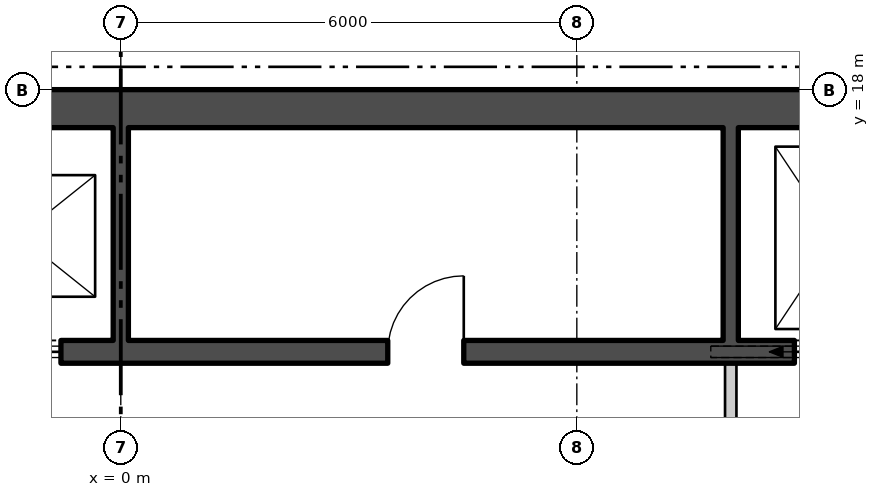
"""IFC4 building model, lengths in metres.
Left out: names, types, materials, properties, quantities, classifications, styles, units other than length and angle.
Written with IfcOpenShell. Run it as: python <this file> out.ifc"""

import sys

from ifc_helpers import new_model, si_unit, direction, frame, frame_2d, origin, place, context, subcontext, project, spatial, rectangle, extrude, element, fill, save


model = new_model("IFC4")
c1 = context("Model", 3, precision=1e-05, world=origin(), true_north=direction((0.0, 1.0)))
c2 = subcontext(c1, "Body", "Model", "MODEL_VIEW")
j1 = project(units=[si_unit("LENGTHUNIT", "METRE"), si_unit("PLANEANGLEUNIT", "RADIAN")], contexts=[c1])
p1 = place(None, origin())
s1 = spatial("IfcSite", under=j1, at=p1, CompositionType="ELEMENT")
p2 = place(p1, origin())
s2 = spatial("IfcBuilding", under=s1, at=p2, CompositionType="ELEMENT")
p3 = place(p2, frame((0.0, 0.0, 151.5)))
s3 = spatial("IfcBuildingStorey", under=s2, at=p3, CompositionType="ELEMENT", Elevation=151.5)
p4 = place(p3, frame((-16.2, 17.75, 0.0), z_axis=(0.0, 0.0, 1.0), x_axis=(1.0, 0.0, 0.0)))
e1 = element("IfcWall", 1, at=p4, inside=s3, PredefinedType="SHEAR", context=c2, shape_type="SweptSolid", body=[
    extrude(rectangle(XDim=32.4, YDim=0.5, at=frame_2d((16.2, 0.0))), origin(), (0.0, 0.0, 1.0), 3.7),
])
p5 = place(p3, frame((-10.7, 14.55, 0.0), z_axis=(0.0, 0.0, 1.0), x_axis=(1.0, 0.0, 0.0)))
e2 = element("IfcWall", 2, at=p5, inside=s3, PredefinedType="SHEAR", context=c2, shape_type="SweptSolid", body=[
    extrude(rectangle(XDim=21.4, YDim=0.3, at=frame_2d((10.7, 0.0))), origin(), (0.0, 0.0, 1.0), 3.7),
])
p6 = place(p5, frame((0.738, 0.0, 0.0)))
e3 = element("IfcOpeningElement", 3, at=p6, cuts=e2, PredefinedType="OPENING", context=c2, shape_type="SweptSolid", body=[
    extrude(rectangle(XDim=1.1, YDim=2.1, at=frame_2d((0.55, 1.05))), frame((0.0, 0.16, 0.0), z_axis=(0.0, -1.0, 0.0), x_axis=(1.0, 0.0, 0.0)), (0.0, 0.0, 1.0), 0.32),
])
p7 = place(p5, frame((3.462, 0.0, 0.0)))
e4 = element("IfcOpeningElement", 4, at=p7, cuts=e2, PredefinedType="OPENING", context=c2, shape_type="SweptSolid", body=[
    extrude(rectangle(XDim=1.1, YDim=2.1, at=frame_2d((0.55, 1.05))), frame((0.0, 0.16, 0.0), z_axis=(0.0, -1.0, 0.0), x_axis=(1.0, 0.0, 0.0)), (0.0, 0.0, 1.0), 0.32),
])
p8 = place(p5, frame((6.138, 0.0, 0.0)))
e5 = element("IfcOpeningElement", 5, at=p8, cuts=e2, PredefinedType="OPENING", context=c2, shape_type="SweptSolid", body=[
    extrude(rectangle(XDim=1.1, YDim=2.1, at=frame_2d((0.55, 1.05))), frame((0.0, 0.16, 0.0), z_axis=(0.0, -1.0, 0.0), x_axis=(1.0, 0.0, 0.0)), (0.0, 0.0, 1.0), 0.32),
])
p9 = place(p5, frame((8.812, 0.0, 0.0)))
e6 = element("IfcOpeningElement", 6, at=p9, cuts=e2, PredefinedType="OPENING", context=c2, shape_type="SweptSolid", body=[
    extrude(rectangle(XDim=1.1, YDim=2.1, at=frame_2d((0.55, 1.05))), frame((0.0, 0.16, 0.0), z_axis=(0.0, -1.0, 0.0), x_axis=(1.0, 0.0, 0.0)), (0.0, 0.0, 1.0), 0.32),
])
p10 = place(p5, frame((19.562, 0.0, 0.0)))
e7 = element("IfcOpeningElement", 7, at=p10, cuts=e2, PredefinedType="OPENING", context=c2, shape_type="SweptSolid", body=[
    extrude(rectangle(XDim=1.1, YDim=2.1, at=frame_2d((0.55, 1.05))), frame((0.0, 0.16, 0.0), z_axis=(0.0, -1.0, 0.0), x_axis=(1.0, 0.0, 0.0)), (0.0, 0.0, 1.0), 0.32),
])
p11 = place(p5, frame((14.213, 0.0, 0.0)))
e8 = element("IfcOpeningElement", 8, at=p11, cuts=e2, PredefinedType="OPENING", context=c2, shape_type="SweptSolid", body=[
    extrude(rectangle(XDim=1.0, YDim=2.1, at=frame_2d((0.5, 1.05))), frame((0.0, 0.16, 0.0), z_axis=(0.0, -1.0, 0.0), x_axis=(1.0, 0.0, 0.0)), (0.0, 0.0, 1.0), 0.32),
])
for number, where, z_axis, x_axis in (
    (9, (0.0, 14.7, 0.0), (0.0, 0.0, 1.0), (0.0, 1.0, 0.0)),
    (10, (8.025, 14.7, 0.0), (0.0, 0.0, 1.0), (0.0, 1.0, 0.0)),
):
    element("IfcWall", number, at=place(p3, frame(where, z_axis=z_axis, x_axis=x_axis)), inside=s3, PredefinedType="SHEAR", context=c2, shape_type="SweptSolid", body=[
        extrude(rectangle(XDim=2.8, YDim=0.2, at=frame_2d((1.4, 0.0))), origin(), (0.0, 0.0, 1.0), 3.7),
    ])
p12 = place(p3, frame((8.025, 10.8, 0.0), z_axis=(0.0, 0.0, 1.0), x_axis=(0.0, 1.0, 0.0)))
e11 = element("IfcWall", 11, at=p12, inside=s3, PredefinedType="PARTITIONING", context=c2, shape_type="SweptSolid", body=[
    extrude(rectangle(XDim=3.6, YDim=0.15, at=frame_2d((1.8, 0.0))), origin(), (0.0, 0.0, 1.0), 3.7),
])
p13 = place(p12, frame((1.175, 0.0, 0.0)))
e12 = element("IfcOpeningElement", 12, at=p13, cuts=e11, PredefinedType="OPENING", context=c2, shape_type="SweptSolid", body=[
    extrude(rectangle(XDim=1.25, YDim=2.1, at=frame_2d((0.625, 1.05))), frame((0.0, 0.085, 0.0), z_axis=(0.0, -1.0, 0.0), x_axis=(1.0, 0.0, 0.0)), (0.0, 0.0, 1.0), 0.17),
])
p14 = place(p9, origin())
e13 = element("IfcDoor", 13, at=p14, inside=s3, OperationType="SLIDING_TO_LEFT", PredefinedType="DOOR", context=c2, shape_type="SweptSolid", body=[
    extrude(rectangle(XDim=1.1, YDim=2.1, at=frame_2d((0.55, 1.05))), frame((0.0, 0.025, 0.0), z_axis=(0.0, -1.0, 0.0), x_axis=(1.0, 0.0, 0.0)), (0.0, 0.0, 1.0), 0.05),
])
fill(e6, e13)
p15 = place(p10, origin())
e14 = element("IfcDoor", 14, at=p15, inside=s3, OperationType="SLIDING_TO_LEFT", PredefinedType="DOOR", context=c2, shape_type="SweptSolid", body=[
    extrude(rectangle(XDim=1.1, YDim=2.1, at=frame_2d((0.55, 1.05))), frame((0.0, 0.025, 0.0), z_axis=(0.0, -1.0, 0.0), x_axis=(1.0, 0.0, 0.0)), (0.0, 0.0, 1.0), 0.05),
])
fill(e7, e14)
p16 = place(p11, origin())
e15 = element("IfcDoor", 15, at=p16, inside=s3, OperationType="SINGLE_SWING_LEFT", PredefinedType="DOOR", context=c2, shape_type="SweptSolid", body=[
    extrude(rectangle(XDim=1.0, YDim=2.1, at=frame_2d((0.5, 1.05))), frame((0.0, 0.025, 0.0), z_axis=(0.0, -1.0, 0.0), x_axis=(1.0, 0.0, 0.0)), (0.0, 0.0, 1.0), 0.05),
])
fill(e8, e15)
save(model, sys.argv[1])
